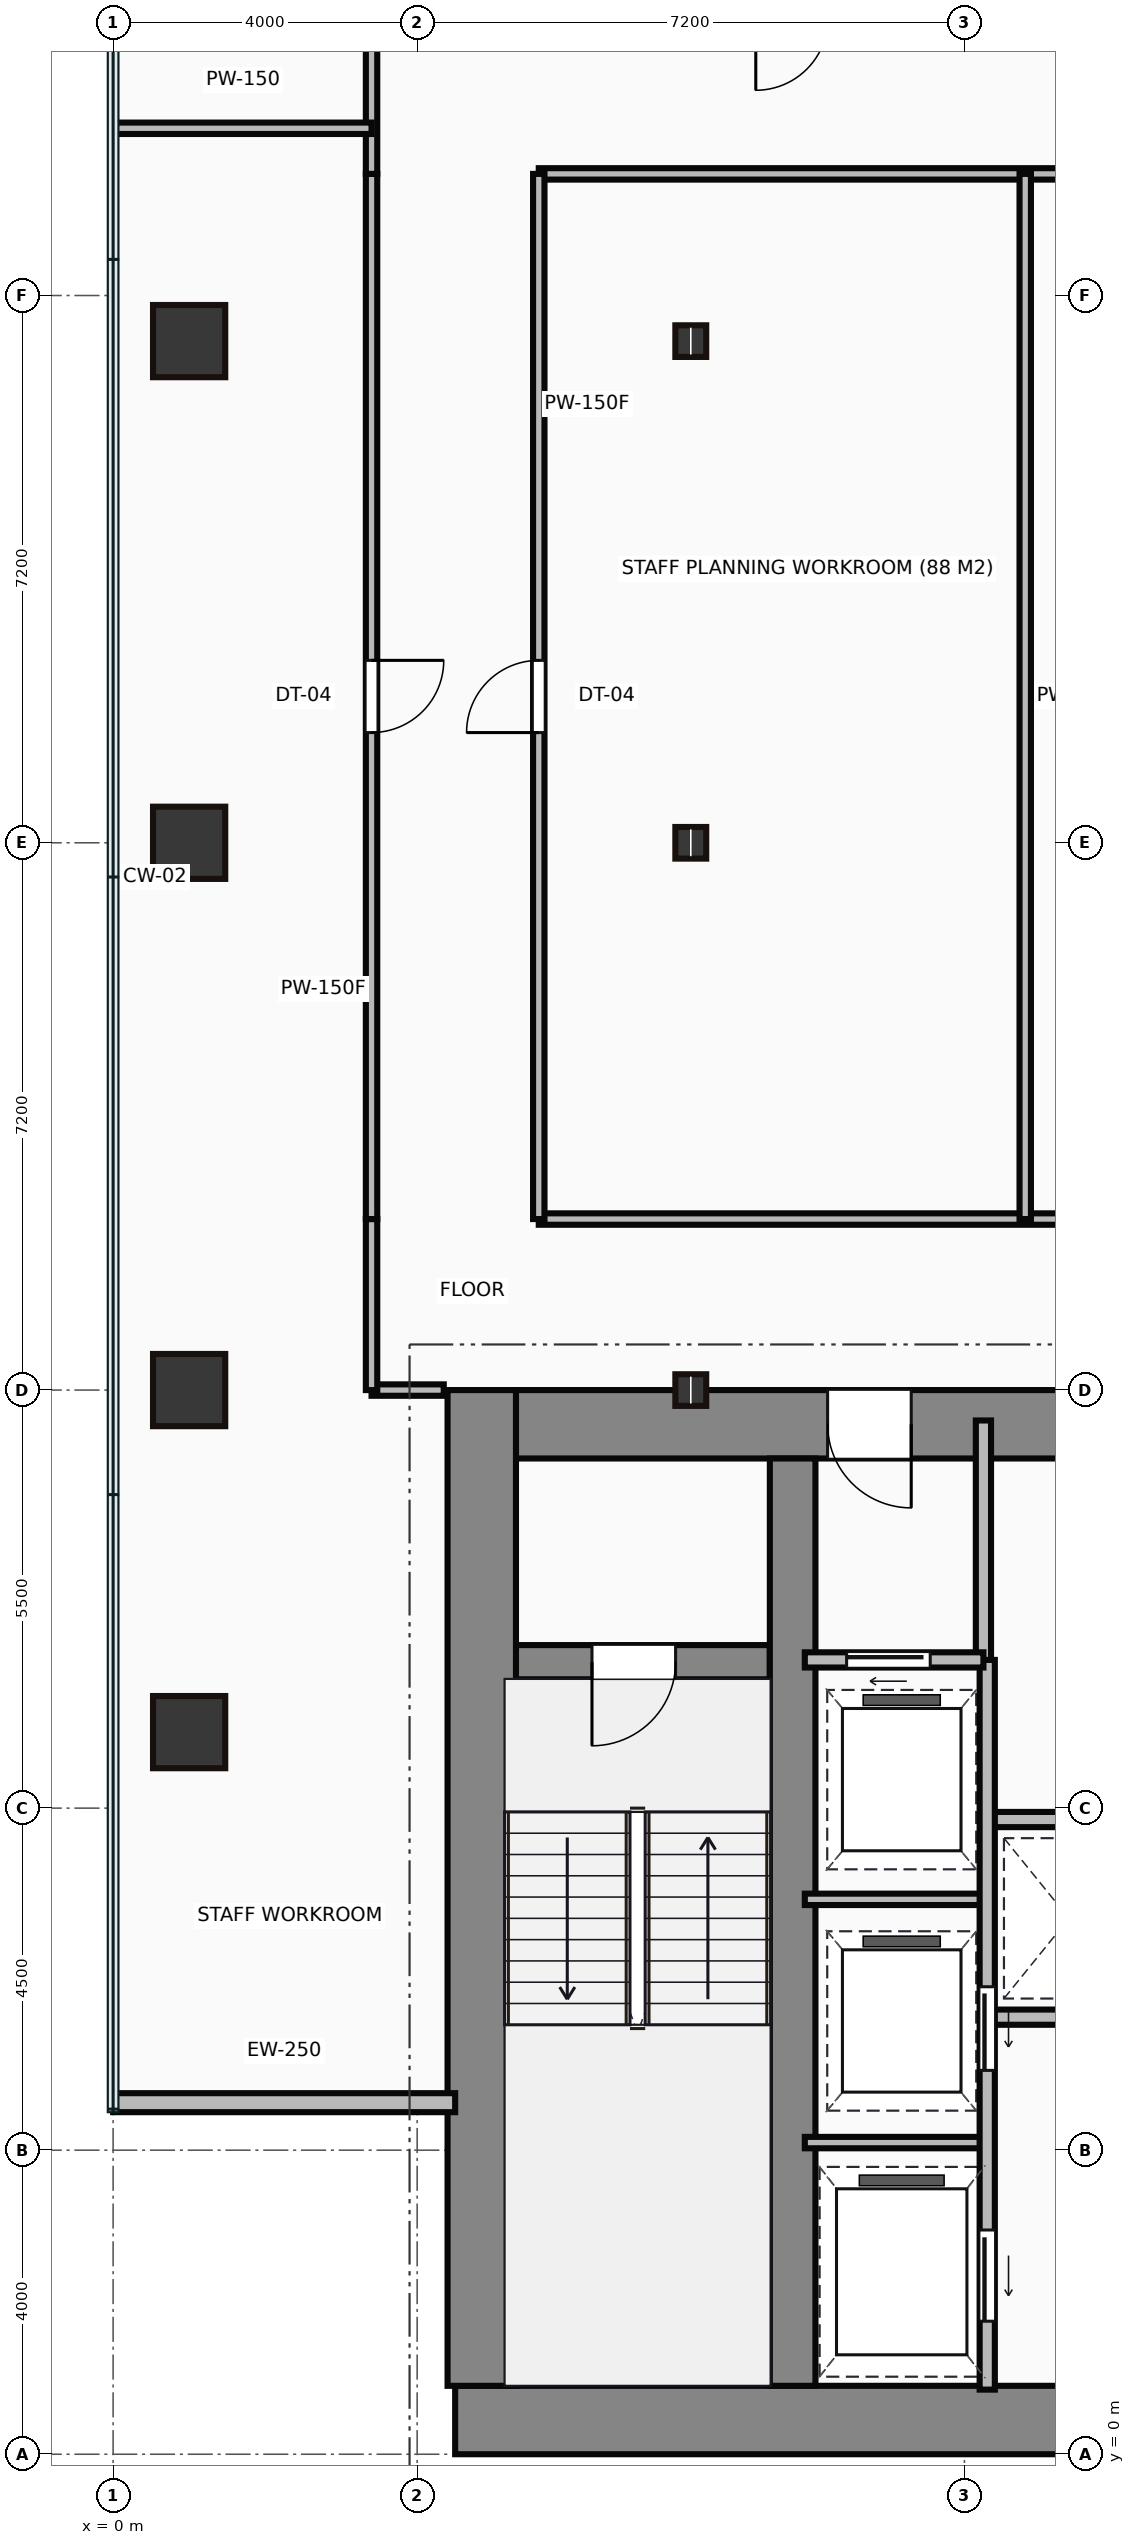
"""IFC4 building model, lengths in metres.
Left out: names, types, materials, properties, quantities, classifications, styles, units other than length and angle.
Written with IfcOpenShell. Run it as: python <this file> out.ifc"""

import sys

from ifc_helpers import new_model, si_unit, direction, frame, frame_2d, origin, origin_2d, place, context, subcontext, project, spatial, rectangle, hollow_rectangle, i_section, extrude, source, transform, mapped, element, fill, save


model = new_model("IFC4")
c1 = context("Model", 3, precision=1e-05, world=origin(), true_north=direction((0.0, 1.0)))
c2 = subcontext(c1, "Body", "Model", "MODEL_VIEW")
j1 = project(units=[si_unit("LENGTHUNIT", "METRE"), si_unit("PLANEANGLEUNIT", "RADIAN")], contexts=[c1])
p1 = place(None, origin())
s1 = spatial("IfcSite", under=j1, at=p1, CompositionType="ELEMENT")
p2 = place(p1, origin())
s2 = spatial("IfcBuilding", under=s1, at=p2, CompositionType="ELEMENT")
p3 = place(p2, frame((0.0, 0.0, 47.1)))
s3 = spatial("IfcBuildingStorey", under=s2, at=p3, CompositionType="ELEMENT", Elevation=47.1)
m1 = source(origin(), c2, "Body", "SweptSolid", [
    extrude(rectangle(XDim=29.5, YDim=0.9, at=frame_2d((14.75, 0.0))), origin(), (0.0, 0.0, 1.0), 3.65),
])
p4 = place(p3, frame((4.5, 0.45, 0.0), z_axis=(0.0, 0.0, 1.0), x_axis=(1.0, 0.0, 0.0)))
e1 = element("IfcWall", 1, at=p4, inside=s3, PredefinedType="SHEAR", context=c2, shape_type="MappedRepresentation", body=[
    mapped(m1, transform((0.0, 0.0, 0.0))),
])
m2 = source(origin(), c2, "Body", "SweptSolid", [
    extrude(rectangle(XDim=13.1, YDim=0.9, at=frame_2d((6.55, 0.0))), origin(), (0.0, 0.0, 1.0), 3.65),
])
p5 = place(p3, frame((4.85, 0.9, 0.0), z_axis=(0.0, 0.0, 1.0), x_axis=(0.0, 1.0, 0.0)))
e2 = element("IfcWall", 2, at=p5, inside=s3, PredefinedType="SHEAR", context=c2, shape_type="MappedRepresentation", body=[
    mapped(m2, transform((0.0, 0.0, 0.0))),
])
m3 = source(origin(), c2, "Body", "SweptSolid", [
    extrude(rectangle(XDim=9.1, YDim=0.9, at=frame_2d((4.55, 0.0))), origin(), (0.0, 0.0, 1.0), 3.65),
])
p6 = place(p3, frame((5.3, 13.55, 0.0), z_axis=(0.0, 0.0, 1.0), x_axis=(1.0, 0.0, 0.0)))
e3 = element("IfcWall", 3, at=p6, inside=s3, PredefinedType="SHEAR", context=c2, shape_type="MappedRepresentation", body=[
    mapped(m3, transform((0.0, 0.0, 0.0))),
])
p7 = place(p6, frame((4.1, 0.0, 0.0)))
e4 = element("IfcOpeningElement", 4, at=p7, cuts=e3, PredefinedType="OPENING", context=c2, shape_type="SweptSolid", body=[
    extrude(rectangle(XDim=1.1, YDim=2.15, at=frame_2d((0.55, 1.075))), frame((0.0, 0.46, 0.0), z_axis=(0.0, -1.0, 0.0), x_axis=(1.0, 0.0, 0.0)), (0.0, 0.0, 1.0), 0.92),
])
m4 = source(origin(), c2, "Body", "SweptSolid", [
    extrude(rectangle(XDim=12.2, YDim=0.6, at=frame_2d((6.1, 0.0))), origin(), (0.0, 0.0, 1.0), 3.65),
])
p8 = place(p3, frame((8.94, 0.9, 0.0), z_axis=(0.0, 0.0, 1.0), x_axis=(0.0, 1.0, 0.0)))
e5 = element("IfcWall", 5, at=p8, inside=s3, PredefinedType="SHEAR", context=c2, shape_type="MappedRepresentation", body=[
    mapped(m4, transform((0.0, 0.0, 0.0))),
])
m5 = source(origin(), c2, "Body", "SweptSolid", [
    extrude(rectangle(XDim=3.39, YDim=0.45, at=frame_2d((1.695, 0.0))), origin(), (0.0, 0.0, 1.0), 3.65),
])
p9 = place(p3, frame((5.25, 10.42, 0.0), z_axis=(0.0, 0.0, 1.0), x_axis=(1.0, 0.0, 0.0)))
e6 = element("IfcWall", 6, at=p9, inside=s3, PredefinedType="SHEAR", context=c2, shape_type="MappedRepresentation", body=[
    mapped(m5, transform((0.0, 0.0, 0.0))),
])
p10 = place(p9, frame((1.05, 0.0, 0.0)))
e7 = element("IfcOpeningElement", 7, at=p10, cuts=e6, PredefinedType="OPENING", context=c2, shape_type="SweptSolid", body=[
    extrude(rectangle(XDim=1.1, YDim=2.15, at=frame_2d((0.55, 1.075))), frame((0.0, 0.235, 0.0), z_axis=(0.0, -1.0, 0.0), x_axis=(1.0, 0.0, 0.0)), (0.0, 0.0, 1.0), 0.47),
])
m6 = source(origin(), c2, "Body", "SweptSolid", [
    extrude(hollow_rectangle(XDim=0.95, YDim=0.95, WallThickness=0.045, at=origin_2d()), origin(), (0.0, 0.0, 1.0), 3.65),
])
for number, where, z_axis, x_axis in (
    (8, (1.0, 9.5, 0.0), (0.0, 0.0, 1.0), (1.0, 0.0, 0.0)),
    (9, (1.0, 14.0, 0.0), (0.0, 0.0, 1.0), (1.0, 0.0, 0.0)),
    (10, (1.0, 21.2, 0.0), (0.0, 0.0, 1.0), (1.0, 0.0, 0.0)),
    (11, (1.0, 27.8, 0.0), (0.0, 0.0, 1.0), (1.0, 0.0, 0.0)),
):
    element("IfcColumn", number, at=place(p3, frame(where, z_axis=z_axis, x_axis=x_axis)), inside=s3, PredefinedType="COLUMN", context=c2, shape_type="MappedRepresentation", body=[
        mapped(m6, transform((0.0, 0.0, 0.0))),
    ])
m7 = source(origin(), c2, "Body", "SweptSolid", [
    extrude(i_section(OverallWidth=0.406, OverallDepth=0.416, WebThickness=0.03, FlangeThickness=0.048, at=origin_2d()), origin(), (0.0, 0.0, 1.0), 3.65),
])
for number, where, z_axis, x_axis in (
    (12, (7.6, 14.0, 0.0), (0.0, 0.0, 1.0), (1.0, 0.0, 0.0)),
    (13, (7.6, 21.2, 0.0), (0.0, 0.0, 1.0), (1.0, 0.0, 0.0)),
    (14, (7.6, 27.8, 0.0), (0.0, 0.0, 1.0), (1.0, 0.0, 0.0)),
):
    element("IfcColumn", number, at=place(p3, frame(where, z_axis=z_axis, x_axis=x_axis)), inside=s3, PredefinedType="COLUMN", context=c2, shape_type="MappedRepresentation", body=[
        mapped(m7, transform((0.0, 0.0, 0.0))),
    ])
m8 = source(origin(), c2, "Body", "SweptSolid", [
    extrude(rectangle(XDim=4.5, YDim=0.25, at=frame_2d((2.25, 0.0))), origin(), (0.0, 0.0, 1.0), 3.4),
])
p11 = place(p3, frame((0.0, 4.625, 0.0), z_axis=(0.0, 0.0, 1.0), x_axis=(1.0, 0.0, 0.0)))
e15 = element("IfcWall", 15, at=p11, inside=s3, PredefinedType="STANDARD", context=c2, shape_type="MappedRepresentation", body=[
    mapped(m8, transform((0.0, 0.0, 0.0))),
])
m9 = source(origin(), c2, "Body", "SweptSolid", [
    extrude(rectangle(XDim=3.18, YDim=0.2, at=frame_2d((1.59, 0.0))), origin(), (0.0, 0.0, 1.0), 3.4),
])
p12 = place(p3, frame((11.45, 10.42, 0.0), z_axis=(0.0, 0.0, 1.0), x_axis=(0.0, 1.0, 0.0)))
e16 = element("IfcWall", 16, at=p12, inside=s3, PredefinedType="PARTITIONING", context=c2, shape_type="MappedRepresentation", body=[
    mapped(m9, transform((0.0, 0.0, 0.0))),
])
m10 = source(origin(), c2, "Body", "SweptSolid", [
    extrude(rectangle(XDim=2.35, YDim=0.2, at=frame_2d((1.175, 0.0))), origin(), (0.0, 0.0, 1.0), 3.4),
])
p13 = place(p3, frame((9.1, 10.45, 0.0), z_axis=(0.0, 0.0, 1.0), x_axis=(1.0, 0.0, 0.0)))
e17 = element("IfcWall", 17, at=p13, inside=s3, PredefinedType="PARTITIONING", context=c2, shape_type="MappedRepresentation", body=[
    mapped(m10, transform((0.0, 0.0, 0.0))),
])
p14 = place(p13, frame((0.55, 0.0, 0.0)))
e18 = element("IfcOpeningElement", 18, at=p14, cuts=e17, PredefinedType="OPENING", context=c2, shape_type="SweptSolid", body=[
    extrude(rectangle(XDim=1.1, YDim=2.15, at=frame_2d((0.55, 1.075))), frame((0.0, 0.11, 0.0), z_axis=(0.0, -1.0, 0.0), x_axis=(1.0, 0.0, 0.0)), (0.0, 0.0, 1.0), 0.22),
])
m11 = source(origin(), c2, "Body", "SweptSolid", [
    extrude(rectangle(XDim=9.6, YDim=0.2, at=frame_2d((4.8, 0.0))), origin(), (0.0, 0.0, 1.0), 3.4),
])
p15 = place(p3, frame((11.5, 0.85, 0.0), z_axis=(0.0, 0.0, 1.0), x_axis=(0.0, 1.0, 0.0)))
e19 = element("IfcWall", 19, at=p15, inside=s3, PredefinedType="PARTITIONING", context=c2, shape_type="MappedRepresentation", body=[
    mapped(m11, transform((0.0, 0.0, 0.0))),
])
p16 = place(p15, frame((4.2, 0.0, 0.0)))
e20 = element("IfcOpeningElement", 20, at=p16, cuts=e19, PredefinedType="OPENING", context=c2, shape_type="SweptSolid", body=[
    extrude(rectangle(XDim=1.1, YDim=2.15, at=frame_2d((0.55, 1.075))), frame((0.0, 0.11, 0.0), z_axis=(0.0, -1.0, 0.0), x_axis=(1.0, 0.0, 0.0)), (0.0, 0.0, 1.0), 0.22),
])
p17 = place(p15, frame((0.9, 0.0, 0.0)))
e21 = element("IfcOpeningElement", 21, at=p17, cuts=e19, PredefinedType="OPENING", context=c2, shape_type="SweptSolid", body=[
    extrude(rectangle(XDim=1.2, YDim=2.15, at=frame_2d((0.6, 1.075))), frame((0.0, 0.11, 0.0), z_axis=(0.0, -1.0, 0.0), x_axis=(1.0, 0.0, 0.0)), (0.0, 0.0, 1.0), 0.22),
])
m12 = source(origin(), c2, "Body", "SweptSolid", [
    extrude(rectangle(XDim=2.4, YDim=0.15, at=frame_2d((1.2, 0.0))), origin(), (0.0, 0.0, 1.0), 3.4),
])
for number, where, z_axis, x_axis in (
    (22, (9.1, 4.1, 0.0), (0.0, 0.0, 1.0), (1.0, 0.0, 0.0)),
    (23, (9.1, 7.3, 0.0), (0.0, 0.0, 1.0), (1.0, 0.0, 0.0)),
):
    element("IfcWall", number, at=place(p3, frame(where, z_axis=z_axis, x_axis=x_axis)), inside=s3, PredefinedType="PARTITIONING", context=c2, shape_type="MappedRepresentation", body=[
        mapped(m12, transform((0.0, 0.0, 0.0))),
    ])
m13 = source(origin(), c2, "Body", "SweptSolid", [
    extrude(rectangle(XDim=11.85, YDim=0.2, at=frame_2d((5.925, 0.0))), origin(), (0.0, 0.0, 1.0), 3.4),
])
for number, where, z_axis, x_axis in (
    (24, (11.55, 5.75, 0.0), (0.0, 0.0, 1.0), (1.0, 0.0, 0.0)),
    (25, (11.55, 8.35, 0.0), (0.0, 0.0, 1.0), (1.0, 0.0, 0.0)),
):
    element("IfcWall", number, at=place(p3, frame(where, z_axis=z_axis, x_axis=x_axis)), inside=s3, PredefinedType="PARTITIONING", context=c2, shape_type="MappedRepresentation", body=[
        mapped(m13, transform((0.0, 0.0, 0.0))),
    ])
m14 = source(origin(), c2, "Body", "SweptSolid", [
    extrude(rectangle(XDim=0.95, YDim=0.15, at=frame_2d((0.475, 0.0))), origin(), (0.0, 0.0, 1.0), 2.625),
])
p18 = place(p3, frame((4.35, 14.0, 0.0), z_axis=(0.0, 0.0, 1.0), x_axis=(-1.0, 0.0, 0.0)))
e26 = element("IfcWall", 26, at=p18, inside=s3, PredefinedType="PARTITIONING", context=c2, shape_type="MappedRepresentation", body=[
    mapped(m14, transform((0.0, 0.0, 0.0))),
])
m15 = source(origin(), c2, "Body", "SweptSolid", [
    extrude(rectangle(XDim=2.25, YDim=0.15, at=frame_2d((1.125, 0.0))), origin(), (0.0, 0.0, 1.0), 3.4),
])
p19 = place(p3, frame((3.4, 14.0, 0.0), z_axis=(0.0, 0.0, 1.0), x_axis=(0.0, 1.0, 0.0)))
e27 = element("IfcWall", 27, at=p19, inside=s3, PredefinedType="PARTITIONING", context=c2, shape_type="MappedRepresentation", body=[
    mapped(m15, transform((0.0, 0.0, 0.0))),
])
m16 = source(origin(), c2, "Body", "SweptSolid", [
    extrude(rectangle(XDim=13.75, YDim=0.15, at=frame_2d((6.875, 0.0))), origin(), (0.0, 0.0, 1.0), 3.4),
])
p20 = place(p3, frame((3.4, 16.25, 0.0), z_axis=(0.0, 0.0, 1.0), x_axis=(0.0, 1.0, 0.0)))
e28 = element("IfcWall", 28, at=p20, inside=s3, PredefinedType="PARTITIONING", context=c2, shape_type="MappedRepresentation", body=[
    mapped(m16, transform((0.0, 0.0, 0.0))),
])
p21 = place(p20, frame((6.4, 0.0, 0.0)))
e29 = element("IfcOpeningElement", 29, at=p21, cuts=e28, PredefinedType="OPENING", context=c2, shape_type="SweptSolid", body=[
    extrude(rectangle(XDim=0.95, YDim=2.15, at=frame_2d((0.475, 1.075))), frame((0.0, 0.085, 0.0), z_axis=(0.0, -1.0, 0.0), x_axis=(1.0, 0.0, 0.0)), (0.0, 0.0, 1.0), 0.17),
])
m17 = source(origin(), c2, "Body", "SweptSolid", [
    extrude(rectangle(XDim=2.05, YDim=0.15, at=frame_2d((1.025, 0.0))), origin(), (0.0, 0.0, 1.0), 3.4),
])
p22 = place(p3, frame((3.4, 30.0, 0.0), z_axis=(0.0, 0.0, 1.0), x_axis=(0.0, 1.0, 0.0)))
e30 = element("IfcWall", 30, at=p22, inside=s3, PredefinedType="PARTITIONING", context=c2, shape_type="MappedRepresentation", body=[
    mapped(m17, transform((0.0, 0.0, 0.0))),
])
m18 = source(origin(), c2, "Body", "SweptSolid", [
    extrude(rectangle(XDim=31.6, YDim=0.15, at=frame_2d((15.8, 0.0))), origin(), (0.0, 0.0, 1.0), 3.4),
])
p23 = place(p3, frame((5.6, 16.25, 0.0), z_axis=(0.0, 0.0, 1.0), x_axis=(1.0, 0.0, 0.0)))
e31 = element("IfcWall", 31, at=p23, inside=s3, PredefinedType="PARTITIONING", context=c2, shape_type="MappedRepresentation", body=[
    mapped(m18, transform((0.0, 0.0, 0.0))),
])
p24 = place(p23, frame((10.125, 0.0, 0.0)))
e32 = element("IfcOpeningElement", 32, at=p24, cuts=e31, PredefinedType="OPENING", context=c2, shape_type="SweptSolid", body=[
    extrude(rectangle(XDim=0.95, YDim=2.15, at=frame_2d((0.475, 1.075))), frame((0.0, 0.085, 0.0), z_axis=(0.0, -1.0, 0.0), x_axis=(1.0, 0.0, 0.0)), (0.0, 0.0, 1.0), 0.17),
])
p25 = place(p23, frame((18.925, 0.0, 0.0)))
e33 = element("IfcOpeningElement", 33, at=p25, cuts=e31, PredefinedType="OPENING", context=c2, shape_type="SweptSolid", body=[
    extrude(rectangle(XDim=0.95, YDim=2.15, at=frame_2d((0.475, 1.075))), frame((0.0, 0.085, 0.0), z_axis=(0.0, -1.0, 0.0), x_axis=(1.0, 0.0, 0.0)), (0.0, 0.0, 1.0), 0.17),
])
m19 = source(origin(), c2, "Body", "SweptSolid", [
    extrude(rectangle(XDim=31.6, YDim=0.15, at=frame_2d((15.8, 0.0))), origin(), (0.0, 0.0, 1.0), 2.978),
])
p26 = place(p3, frame((37.2, 30.0, 0.0), z_axis=(0.0, 0.0, 1.0), x_axis=(-1.0, 0.0, 0.0)))
e34 = element("IfcWall", 34, at=p26, inside=s3, PredefinedType="PARTITIONING", context=c2, shape_type="MappedRepresentation", body=[
    mapped(m19, transform((0.0, 0.0, 0.0))),
])
p27 = place(p3, frame((5.6, 30.0, 0.0), z_axis=(0.0, 0.0, 1.0), x_axis=(0.0, -1.0, 0.0)))
e35 = element("IfcWall", 35, at=p27, inside=s3, PredefinedType="PARTITIONING", context=c2, shape_type="MappedRepresentation", body=[
    mapped(m16, transform((0.0, 0.0, 0.0))),
])
p28 = place(p27, frame((6.4, 0.0, 0.0)))
e36 = element("IfcOpeningElement", 36, at=p28, cuts=e35, PredefinedType="OPENING", context=c2, shape_type="SweptSolid", body=[
    extrude(rectangle(XDim=0.95, YDim=2.15, at=frame_2d((0.475, 1.075))), frame((0.0, 0.085, 0.0), z_axis=(0.0, -1.0, 0.0), x_axis=(1.0, 0.0, 0.0)), (0.0, 0.0, 1.0), 0.17),
])
m20 = source(origin(), c2, "Body", "SweptSolid", [
    extrude(rectangle(XDim=3.38, YDim=0.15, at=frame_2d((1.69, 0.0))), origin(), (0.0, 0.0, 1.0), 3.4),
])
p29 = place(p3, frame((0.02, 30.6, 0.0), z_axis=(0.0, 0.0, 1.0), x_axis=(1.0, 0.0, 0.0)))
e37 = element("IfcWall", 37, at=p29, inside=s3, PredefinedType="PARTITIONING", context=c2, shape_type="MappedRepresentation", body=[
    mapped(m20, transform((0.0, 0.0, 0.0))),
])
p30 = place(p3, frame((12.0, 30.0, 0.0), z_axis=(0.0, 0.0, 1.0), x_axis=(0.0, -1.0, 0.0)))
e38 = element("IfcWall", 38, at=p30, inside=s3, PredefinedType="PARTITIONING", context=c2, shape_type="MappedRepresentation", body=[
    mapped(m16, transform((0.0, 0.0, 0.0))),
])
m21 = source(origin(), c2, "Body", "SweptSolid", [
    extrude(rectangle(XDim=1.1, YDim=2.15, at=frame_2d((0.55, 1.075))), frame((0.0, 0.025, 0.0), z_axis=(0.0, -1.0, 0.0), x_axis=(1.0, 0.0, 0.0)), (0.0, 0.0, 1.0), 0.05),
])
p31 = place(p10, frame((1.1, 0.0, 0.0), z_axis=(0.0, 0.0, 1.0), x_axis=(-1.0, 0.0, 0.0)))
e39 = element("IfcDoor", 39, at=p31, inside=s3, OperationType="SINGLE_SWING_LEFT", PredefinedType="DOOR", context=c2, shape_type="MappedRepresentation", body=[
    mapped(m21, transform((0.0, 0.0, 0.0))),
])
fill(e7, e39)
p32 = place(p7, origin())
e40 = element("IfcDoor", 40, at=p32, inside=s3, OperationType="SINGLE_SWING_RIGHT", PredefinedType="DOOR", context=c2, shape_type="MappedRepresentation", body=[
    mapped(m21, transform((0.0, 0.0, 0.0))),
])
fill(e4, e40)
p33 = place(p14, origin())
e41 = element("IfcDoor", 41, at=p33, inside=s3, OperationType="SLIDING_TO_LEFT", PredefinedType="DOOR", context=c2, shape_type="MappedRepresentation", body=[
    mapped(m21, transform((0.0, 0.0, 0.0))),
])
fill(e18, e41)
p34 = place(p16, frame((1.1, 0.0, 0.0), z_axis=(0.0, 0.0, 1.0), x_axis=(-1.0, 0.0, 0.0)))
e42 = element("IfcDoor", 42, at=p34, inside=s3, OperationType="SLIDING_TO_LEFT", PredefinedType="DOOR", context=c2, shape_type="MappedRepresentation", body=[
    mapped(m21, transform((0.0, 0.0, 0.0))),
])
fill(e20, e42)
m22 = source(origin(), c2, "Body", "SweptSolid", [
    extrude(rectangle(XDim=1.2, YDim=2.15, at=frame_2d((0.6, 1.075))), frame((0.0, 0.025, 0.0), z_axis=(0.0, -1.0, 0.0), x_axis=(1.0, 0.0, 0.0)), (0.0, 0.0, 1.0), 0.05),
])
p35 = place(p17, frame((1.2, 0.0, 0.0), z_axis=(0.0, 0.0, 1.0), x_axis=(-1.0, 0.0, 0.0)))
e43 = element("IfcDoor", 43, at=p35, inside=s3, OperationType="SLIDING_TO_LEFT", PredefinedType="DOOR", context=c2, shape_type="MappedRepresentation", body=[
    mapped(m22, transform((0.0, 0.0, 0.0))),
])
fill(e21, e43)
m23 = source(origin(), c2, "Body", "SweptSolid", [
    extrude(rectangle(XDim=0.95, YDim=2.15, at=frame_2d((0.475, 1.075))), frame((0.0, 0.025, 0.0), z_axis=(0.0, -1.0, 0.0), x_axis=(1.0, 0.0, 0.0)), (0.0, 0.0, 1.0), 0.05),
])
p36 = place(p21, origin())
e44 = element("IfcDoor", 44, at=p36, inside=s3, OperationType="SINGLE_SWING_RIGHT", PredefinedType="DOOR", context=c2, shape_type="MappedRepresentation", body=[
    mapped(m23, transform((0.0, 0.0, 0.0))),
])
fill(e29, e44)
p37 = place(p28, origin())
e45 = element("IfcDoor", 45, at=p37, inside=s3, OperationType="SINGLE_SWING_RIGHT", PredefinedType="DOOR", context=c2, shape_type="MappedRepresentation", body=[
    mapped(m23, transform((0.0, 0.0, 0.0))),
])
fill(e36, e45)
save(model, sys.argv[1])
